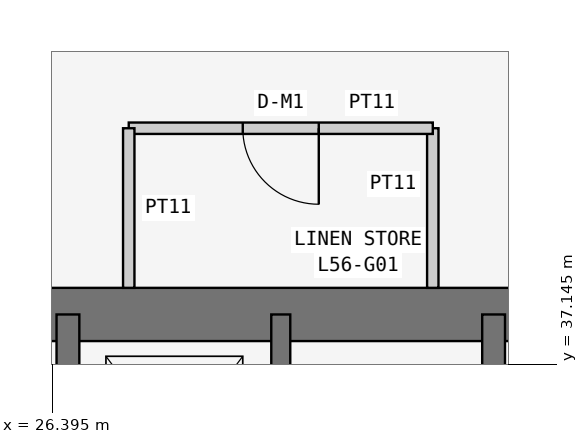
"""IFC4 building model, lengths in metres.
Left out: names, types, materials, properties, quantities, classifications, styles, units other than length and angle.
Written with IfcOpenShell. Run it as: python <this file> out.ifc"""

import sys

from ifc_helpers import new_model, si_unit, direction, frame, frame_2d, origin, place, context, subcontext, project, spatial, rectangle, extrude, element, fill, save


model = new_model("IFC4")
c1 = context("Model", 3, precision=1e-05, world=origin(), true_north=direction((0.0, 1.0)))
c2 = subcontext(c1, "Body", "Model", "MODEL_VIEW")
j1 = project(units=[si_unit("LENGTHUNIT", "METRE"), si_unit("PLANEANGLEUNIT", "RADIAN")], contexts=[c1])
p1 = place(None, origin())
s1 = spatial("IfcSite", under=j1, at=p1, CompositionType="ELEMENT")
p2 = place(p1, origin())
s2 = spatial("IfcBuilding", under=s1, at=p2, CompositionType="ELEMENT")
p3 = place(p2, frame((0.0, 0.0, 215.7)))
s3 = spatial("IfcBuildingStorey", under=s2, at=p3, CompositionType="ELEMENT", Elevation=215.7)
p4 = place(p3, frame((37.8, 37.8, 0.0), z_axis=(0.0, 0.0, 1.0), x_axis=(-1.0, 0.0, 0.0)))
e1 = element("IfcWall", 1, at=p4, inside=s3, PredefinedType="SHEAR", context=c2, shape_type="SweptSolid", body=[
    extrude(rectangle(XDim=17.15, YDim=0.7, at=frame_2d((8.575, 0.0))), origin(), (0.0, 0.0, 1.0), 3.6),
])
p5 = place(p3, frame((26.6, 21.0, 0.0), z_axis=(0.0, 0.0, 1.0), x_axis=(0.0, 1.0, 0.0)))
e2 = element("IfcWall", 2, at=p5, inside=s3, PredefinedType="SHEAR", context=c2, shape_type="SweptSolid", body=[
    extrude(rectangle(XDim=16.8, YDim=0.3, at=frame_2d((8.4, 0.0))), origin(), (0.0, 0.0, 1.0), 3.6),
])
p6 = place(p5, frame((10.4, 0.0, 0.0)))
e3 = element("IfcOpeningElement", 3, at=p6, cuts=e2, PredefinedType="OPENING", context=c2, shape_type="SweptSolid", body=[
    extrude(rectangle(XDim=1.2, YDim=2.1, at=frame_2d((0.6, 1.05))), frame((0.0, 0.16, 0.0), z_axis=(0.0, -1.0, 0.0), x_axis=(1.0, 0.0, 0.0)), (0.0, 0.0, 1.0), 0.32),
])
p7 = place(p3, frame((32.2, 29.25, 0.0), z_axis=(0.0, 0.0, 1.0), x_axis=(0.0, 1.0, 0.0)))
e4 = element("IfcWall", 4, at=p7, inside=s3, PredefinedType="SHEAR", context=c2, shape_type="SweptSolid", body=[
    extrude(rectangle(XDim=8.55, YDim=0.3, at=frame_2d((4.275, 0.0))), origin(), (0.0, 0.0, 1.0), 3.6),
])
p8 = place(p3, frame((29.4, 34.6, 0.0), z_axis=(0.0, 0.0, 1.0), x_axis=(0.0, 1.0, 0.0)))
e5 = element("IfcWall", 5, at=p8, inside=s3, PredefinedType="SHEAR", context=c2, shape_type="SweptSolid", body=[
    extrude(rectangle(XDim=3.2, YDim=0.25, at=frame_2d((1.6, 0.0))), origin(), (0.0, 0.0, 1.0), 3.6),
])
p9 = place(p3, frame((31.4, 38.15, 0.0), z_axis=(0.0, 0.0, 1.0), x_axis=(0.0, 1.0, 0.0)))
e6 = element("IfcWall", 6, at=p9, inside=s3, PredefinedType="PARTITIONING", context=c2, shape_type="SweptSolid", body=[
    extrude(rectangle(XDim=2.1, YDim=0.15, at=frame_2d((1.05, 0.0))), origin(), (0.0, 0.0, 1.0), 3.45),
])
p10 = place(p3, frame((31.4, 40.25, 0.0), z_axis=(0.0, 0.0, 1.0), x_axis=(-1.0, 0.0, 0.0)))
e7 = element("IfcWall", 7, at=p10, inside=s3, PredefinedType="PARTITIONING", context=c2, shape_type="SweptSolid", body=[
    extrude(rectangle(XDim=4.0, YDim=0.15, at=frame_2d((2.0, 0.0))), origin(), (0.0, 0.0, 1.0), 3.45),
])
p11 = place(p10, frame((1.5, 0.0, 0.0)))
e8 = element("IfcOpeningElement", 8, at=p11, cuts=e7, PredefinedType="OPENING", context=c2, shape_type="SweptSolid", body=[
    extrude(rectangle(XDim=1.0, YDim=2.1, at=frame_2d((0.5, 1.05))), frame((0.0, 0.085, 0.0), z_axis=(0.0, -1.0, 0.0), x_axis=(1.0, 0.0, 0.0)), (0.0, 0.0, 1.0), 0.17),
])
p12 = place(p3, frame((27.4, 40.25, 0.0), z_axis=(0.0, 0.0, 1.0), x_axis=(0.0, -1.0, 0.0)))
e9 = element("IfcWall", 9, at=p12, inside=s3, PredefinedType="PARTITIONING", context=c2, shape_type="SweptSolid", body=[
    extrude(rectangle(XDim=2.1, YDim=0.15, at=frame_2d((1.05, 0.0))), origin(), (0.0, 0.0, 1.0), 3.45),
])
p13 = place(p11, origin())
e10 = element("IfcDoor", 10, at=p13, inside=s3, OperationType="SINGLE_SWING_LEFT", PredefinedType="DOOR", context=c2, shape_type="SweptSolid", body=[
    extrude(rectangle(XDim=1.0, YDim=2.1, at=frame_2d((0.5, 1.05))), frame((0.0, 0.025, 0.0), z_axis=(0.0, -1.0, 0.0), x_axis=(1.0, 0.0, 0.0)), (0.0, 0.0, 1.0), 0.05),
])
fill(e8, e10)
save(model, sys.argv[1])
